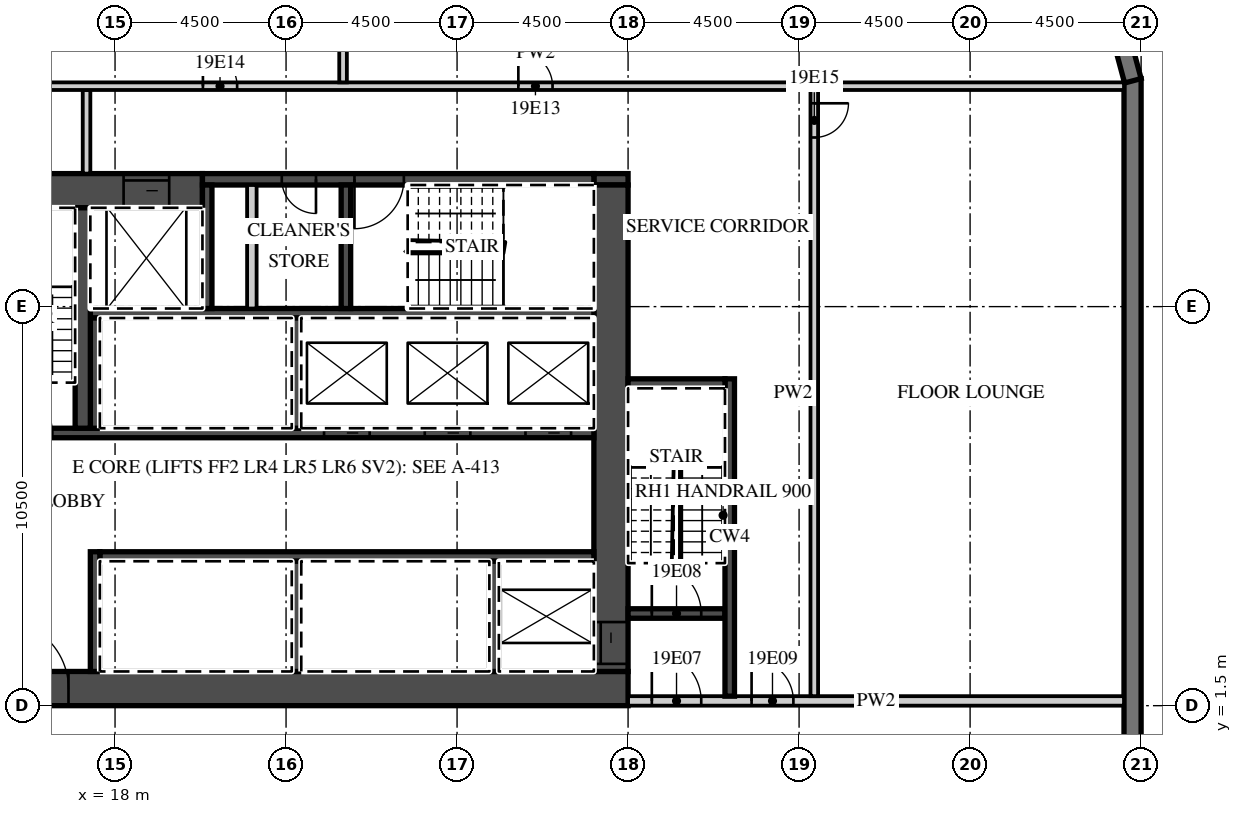
"""IFC4 building model, lengths in metres.
Left out: names, types, materials, properties, quantities, classifications, styles, units other than length and angle.
Written with IfcOpenShell. Run it as: python <this file> out.ifc"""

import sys

from ifc_helpers import new_model, si_unit, direction, frame, frame_2d, origin, place, context, subcontext, project, spatial, polyline, rectangle, outline, extrude, element, fill, save


model = new_model("IFC4")
c1 = context("Model", 3, precision=1e-05, world=origin(), true_north=direction((0.0, 1.0)))
c2 = subcontext(c1, "Body", "Model", "MODEL_VIEW")
j1 = project(units=[si_unit("LENGTHUNIT", "METRE"), si_unit("PLANEANGLEUNIT", "RADIAN")], contexts=[c1])
p1 = place(None, origin())
s1 = spatial("IfcSite", under=j1, at=p1, CompositionType="ELEMENT")
p2 = place(p1, origin())
s2 = spatial("IfcBuilding", under=s1, at=p2, CompositionType="ELEMENT")
p3 = place(p2, frame((0.0, 0.0, 93.0)))
s3 = spatial("IfcBuildingStorey", under=s2, at=p3, CompositionType="ELEMENT", Elevation=93.0)
p4 = place(p3, frame((44.775, -18.0, 0.0), z_axis=(0.0, 0.0, 1.0), x_axis=(0.0, 1.0, 0.0)))
e1 = element("IfcWall", 1, at=p4, inside=s3, PredefinedType="SOLIDWALL", context=c2, shape_type="SweptSolid", body=[
    extrude(rectangle(XDim=36.0, YDim=0.45, at=frame_2d((18.0, 0.0))), origin(), (0.0, 0.0, 1.0), 3.02),
])
p5 = place(p4, frame((3.9, 0.0, 0.45)))
e2 = element("IfcOpeningElement", 2, at=p5, cuts=e1, PredefinedType="OPENING", context=c2, shape_type="SweptSolid", body=[
    extrude(rectangle(XDim=3.3, YDim=2.25, at=frame_2d((1.65, 1.125))), frame((0.0, 0.235, 0.0), z_axis=(0.0, -1.0, 0.0), x_axis=(1.0, 0.0, 0.0)), (0.0, 0.0, 1.0), 0.47),
])
p6 = place(p4, frame((8.4, 0.0, 0.45)))
e3 = element("IfcOpeningElement", 3, at=p6, cuts=e1, PredefinedType="OPENING", context=c2, shape_type="SweptSolid", body=[
    extrude(rectangle(XDim=3.3, YDim=2.25, at=frame_2d((1.65, 1.125))), frame((0.0, 0.235, 0.0), z_axis=(0.0, -1.0, 0.0), x_axis=(1.0, 0.0, 0.0)), (0.0, 0.0, 1.0), 0.47),
])
p7 = place(p4, frame((12.9, 0.0, 0.45)))
e4 = element("IfcOpeningElement", 4, at=p7, cuts=e1, PredefinedType="OPENING", context=c2, shape_type="SweptSolid", body=[
    extrude(rectangle(XDim=3.3, YDim=2.25, at=frame_2d((1.65, 1.125))), frame((0.0, 0.235, 0.0), z_axis=(0.0, -1.0, 0.0), x_axis=(1.0, 0.0, 0.0)), (0.0, 0.0, 1.0), 0.47),
])
p8 = place(p3, frame((44.783, 17.942, 0.0), z_axis=(0.0, 0.0, 1.0), x_axis=(-0.25881466832, 0.965926999034, 0.0)))
e5 = element("IfcWall", 5, at=p8, inside=s3, PredefinedType="SOLIDWALL", context=c2, shape_type="SweptSolid", body=[
    extrude(outline(polyline([(0.0, -0.225), (2.071, -0.225), (1.95, 0.225), (0.121, 0.225), (0.0, -0.225)])), origin(), (0.0, 0.0, 1.0), 3.02),
])
p9 = place(p3, frame((13.5, 1.95, 0.0), z_axis=(0.0, 0.0, 1.0), x_axis=(1.0, 0.0, 0.0)))
e6 = element("IfcWall", 6, at=p9, inside=s3, PredefinedType="SHEAR", context=c2, shape_type="SweptSolid", body=[
    extrude(rectangle(XDim=18.0, YDim=0.9, at=frame_2d((9.0, 0.0))), origin(), (0.0, 0.0, 1.0), 3.02),
])
p10 = place(p9, frame((1.475, 0.0, 0.0)))
e7 = element("IfcOpeningElement", 7, at=p10, cuts=e6, PredefinedType="OPENING", context=c2, shape_type="SweptSolid", body=[
    extrude(rectangle(XDim=1.8, YDim=2.1, at=frame_2d((0.9, 1.05))), frame((0.0, 0.46, 0.0), z_axis=(0.0, -1.0, 0.0), x_axis=(1.0, 0.0, 0.0)), (0.0, 0.0, 1.0), 0.92),
])
p11 = place(p3, frame((13.5, 15.05, 0.0), z_axis=(0.0, 0.0, 1.0), x_axis=(1.0, 0.0, 0.0)))
e8 = element("IfcWall", 8, at=p11, inside=s3, PredefinedType="SHEAR", context=c2, shape_type="SweptSolid", body=[
    extrude(rectangle(XDim=6.8, YDim=0.9, at=frame_2d((3.4, 0.0))), origin(), (0.0, 0.0, 1.0), 3.02),
])
p12 = place(p11, frame((4.725, 0.0, 0.0)))
e9 = element("IfcOpeningElement", 9, at=p12, cuts=e8, PredefinedType="OPENING", context=c2, shape_type="SweptSolid", body=[
    extrude(rectangle(XDim=1.2, YDim=2.1, at=frame_2d((0.6, 1.05))), frame((0.0, 0.46, 0.0), z_axis=(0.0, -1.0, 0.0), x_axis=(1.0, 0.0, 0.0)), (0.0, 0.0, 1.0), 0.92),
])
p13 = place(p3, frame((30.6, 15.35, 0.0), z_axis=(0.0, 0.0, 1.0), x_axis=(1.0, 0.0, 0.0)))
e10 = element("IfcWall", 10, at=p13, inside=s3, PredefinedType="SHEAR", context=c2, shape_type="SweptSolid", body=[
    extrude(rectangle(XDim=0.9, YDim=0.3, at=frame_2d((0.45, 0.0))), origin(), (0.0, 0.0, 1.0), 3.02),
])
p14 = place(p3, frame((20.3, 15.35, 0.0), z_axis=(0.0, 0.0, 1.0), x_axis=(1.0, 0.0, 0.0)))
e11 = element("IfcWall", 11, at=p14, inside=s3, PredefinedType="SHEAR", context=c2, shape_type="SweptSolid", body=[
    extrude(rectangle(XDim=10.3, YDim=0.3, at=frame_2d((5.15, 0.0))), origin(), (0.0, 0.0, 1.0), 3.02),
])
p15 = place(p14, frame((4.0, 0.0, 0.0)))
e12 = element("IfcOpeningElement", 12, at=p15, cuts=e11, PredefinedType="OPENING", context=c2, shape_type="SweptSolid", body=[
    extrude(rectangle(XDim=1.3, YDim=2.1, at=frame_2d((0.65, 1.05))), frame((0.0, 0.16, 0.0), z_axis=(0.0, -1.0, 0.0), x_axis=(1.0, 0.0, 0.0)), (0.0, 0.0, 1.0), 0.32),
])
p16 = place(p14, frame((2.087, 0.0, 0.0)))
e13 = element("IfcOpeningElement", 13, at=p16, cuts=e11, PredefinedType="OPENING", context=c2, shape_type="SweptSolid", body=[
    extrude(rectangle(XDim=0.9, YDim=2.1, at=frame_2d((0.45, 1.05))), frame((0.0, 0.16, 0.0), z_axis=(0.0, -1.0, 0.0), x_axis=(1.0, 0.0, 0.0)), (0.0, 0.0, 1.0), 0.32),
])
p17 = place(p3, frame((31.05, 2.4, 0.0), z_axis=(0.0, 0.0, 1.0), x_axis=(0.0, 1.0, 0.0)))
e14 = element("IfcWall", 14, at=p17, inside=s3, PredefinedType="SHEAR", context=c2, shape_type="SweptSolid", body=[
    extrude(rectangle(XDim=12.8, YDim=0.9, at=frame_2d((6.4, 0.0))), origin(), (0.0, 0.0, 1.0), 3.02),
])
p18 = place(p17, frame((0.2, 0.0, 0.0)))
e15 = element("IfcOpeningElement", 15, at=p18, cuts=e14, PredefinedType="OPENING", context=c2, shape_type="SweptSolid", body=[
    extrude(rectangle(XDim=1.1, YDim=2.1, at=frame_2d((0.55, 1.05))), frame((0.0, 0.46, 0.0), z_axis=(0.0, -1.0, 0.0), x_axis=(1.0, 0.0, 0.0)), (0.0, 0.0, 1.0), 0.92),
])
p19 = place(p3, frame((17.6, 5.425, 0.0), z_axis=(0.0, 0.0, 1.0), x_axis=(1.0, 0.0, 0.0)))
e16 = element("IfcWall", 16, at=p19, inside=s3, PredefinedType="SHEAR", context=c2, shape_type="SweptSolid", body=[
    extrude(rectangle(XDim=13.0, YDim=0.25, at=frame_2d((6.5, 0.0))), origin(), (0.0, 0.0, 1.0), 3.02),
])
p20 = place(p3, frame((17.475, 2.4, 0.0), z_axis=(0.0, 0.0, 1.0), x_axis=(0.0, 1.0, 0.0)))
e17 = element("IfcWall", 17, at=p20, inside=s3, PredefinedType="SHEAR", context=c2, shape_type="SweptSolid", body=[
    extrude(rectangle(XDim=3.15, YDim=0.25, at=frame_2d((1.575, 0.0))), origin(), (0.0, 0.0, 1.0), 3.02),
])
for number, where, z_axis, x_axis in (
    (18, (27.975, 2.4, 0.0), (0.0, 0.0, 1.0), (0.0, 1.0, 0.0)),
    (19, (22.775, 2.4, 0.0), (0.0, 0.0, 1.0), (0.0, 1.0, 0.0)),
):
    element("IfcWall", number, at=place(p3, frame(where, z_axis=z_axis, x_axis=x_axis)), inside=s3, PredefinedType="SHEAR", context=c2, shape_type="SweptSolid", body=[
        extrude(rectangle(XDim=2.9, YDim=0.25, at=frame_2d((1.45, 0.0))), origin(), (0.0, 0.0, 1.0), 3.02),
    ])
p21 = place(p3, frame((14.4, 8.675, 0.0), z_axis=(0.0, 0.0, 1.0), x_axis=(1.0, 0.0, 0.0)))
e20 = element("IfcWall", 20, at=p21, inside=s3, PredefinedType="SHEAR", context=c2, shape_type="SweptSolid", body=[
    extrude(rectangle(XDim=16.2, YDim=0.25, at=frame_2d((8.1, 0.0))), origin(), (0.0, 0.0, 1.0), 3.02),
])
p22 = place(p21, frame((14.4, 0.0, 0.0)))
e21 = element("IfcOpeningElement", 21, at=p22, cuts=e20, PredefinedType="OPENING", context=c2, shape_type="SweptSolid", body=[
    extrude(rectangle(XDim=1.2, YDim=2.1, at=frame_2d((0.6, 1.05))), frame((0.0, 0.135, 0.0), z_axis=(0.0, -1.0, 0.0), x_axis=(1.0, 0.0, 0.0)), (0.0, 0.0, 1.0), 0.27),
])
p23 = place(p21, frame((11.75, 0.0, 0.0)))
e22 = element("IfcOpeningElement", 22, at=p23, cuts=e20, PredefinedType="OPENING", context=c2, shape_type="SweptSolid", body=[
    extrude(rectangle(XDim=1.2, YDim=2.1, at=frame_2d((0.6, 1.05))), frame((0.0, 0.135, 0.0), z_axis=(0.0, -1.0, 0.0), x_axis=(1.0, 0.0, 0.0)), (0.0, 0.0, 1.0), 0.27),
])
p24 = place(p21, frame((9.1, 0.0, 0.0)))
e23 = element("IfcOpeningElement", 23, at=p24, cuts=e20, PredefinedType="OPENING", context=c2, shape_type="SweptSolid", body=[
    extrude(rectangle(XDim=1.2, YDim=2.1, at=frame_2d((0.6, 1.05))), frame((0.0, 0.135, 0.0), z_axis=(0.0, -1.0, 0.0), x_axis=(1.0, 0.0, 0.0)), (0.0, 0.0, 1.0), 0.27),
])
p25 = place(p21, frame((0.65, 0.0, 0.0)))
e24 = element("IfcOpeningElement", 24, at=p25, cuts=e20, PredefinedType="OPENING", context=c2, shape_type="SweptSolid", body=[
    extrude(rectangle(XDim=1.3, YDim=2.1, at=frame_2d((0.65, 1.05))), frame((0.0, 0.135, 0.0), z_axis=(0.0, -1.0, 0.0), x_axis=(1.0, 0.0, 0.0)), (0.0, 0.0, 1.0), 0.27),
])
p26 = place(p3, frame((17.35, 11.825, 0.0), z_axis=(0.0, 0.0, 1.0), x_axis=(1.0, 0.0, 0.0)))
e25 = element("IfcWall", 25, at=p26, inside=s3, PredefinedType="SHEAR", context=c2, shape_type="SweptSolid", body=[
    extrude(rectangle(XDim=13.25, YDim=0.25, at=frame_2d((6.625, 0.0))), origin(), (0.0, 0.0, 1.0), 3.02),
])
for number, where, z_axis, x_axis in (
    (26, (17.475, 8.8, 0.0), (0.0, 0.0, 1.0), (0.0, 1.0, 0.0)),
    (27, (22.775, 8.8, 0.0), (0.0, 0.0, 1.0), (0.0, 1.0, 0.0)),
):
    element("IfcWall", number, at=place(p3, frame(where, z_axis=z_axis, x_axis=x_axis)), inside=s3, PredefinedType="SHEAR", context=c2, shape_type="SweptSolid", body=[
        extrude(rectangle(XDim=2.9, YDim=0.25, at=frame_2d((1.45, 0.0))), origin(), (0.0, 0.0, 1.0), 3.02),
    ])
p27 = place(p3, frame((17.15, 8.8, 0.0), z_axis=(0.0, 0.0, 1.0), x_axis=(0.0, 1.0, 0.0)))
e28 = element("IfcWall", 28, at=p27, inside=s3, PredefinedType="SHEAR", context=c2, shape_type="SweptSolid", body=[
    extrude(rectangle(XDim=5.8, YDim=0.4, at=frame_2d((2.9, 0.0))), origin(), (0.0, 0.0, 1.0), 3.02),
])
for number, where, z_axis, x_axis in (
    (29, (20.425, 11.95, 0.0), (0.0, 0.0, 1.0), (0.0, 1.0, 0.0)),
    (30, (24.075, 11.95, 0.0), (0.0, 0.0, 1.0), (0.0, 1.0, 0.0)),
):
    element("IfcWall", number, at=place(p3, frame(where, z_axis=z_axis, x_axis=x_axis)), inside=s3, PredefinedType="SHEAR", context=c2, shape_type="SweptSolid", body=[
        extrude(rectangle(XDim=3.25, YDim=0.25, at=frame_2d((1.625, 0.0))), origin(), (0.0, 0.0, 1.0), 3.02),
    ])
p28 = place(p3, frame((21.6, 11.95, 0.0), z_axis=(0.0, 0.0, 1.0), x_axis=(0.0, 1.0, 0.0)))
e31 = element("IfcWall", 31, at=p28, inside=s3, PredefinedType="PARTITIONING", context=c2, shape_type="SweptSolid", body=[
    extrude(rectangle(XDim=3.25, YDim=0.25, at=frame_2d((1.625, 0.0))), origin(), (0.0, 0.0, 1.0), 3.02),
])
p29 = place(p3, frame((31.5, 1.625, 0.0), z_axis=(0.0, 0.0, 1.0), x_axis=(1.0, 0.0, 0.0)))
e32 = element("IfcWall", 32, at=p29, inside=s3, PredefinedType="PARTITIONING", context=c2, shape_type="SweptSolid", body=[
    extrude(rectangle(XDim=13.05, YDim=0.25, at=frame_2d((6.525, 0.0))), origin(), (0.0, 0.0, 1.0), 3.02),
])
p30 = place(p29, frame((0.625, 0.0, 0.0)))
e33 = element("IfcOpeningElement", 33, at=p30, cuts=e32, PredefinedType="OPENING", context=c2, shape_type="SweptSolid", body=[
    extrude(rectangle(XDim=1.3, YDim=2.1, at=frame_2d((0.65, 1.05))), frame((0.0, 0.135, 0.0), z_axis=(0.0, -1.0, 0.0), x_axis=(1.0, 0.0, 0.0)), (0.0, 0.0, 1.0), 0.27),
])
p31 = place(p29, frame((3.25, 0.0, 0.0)))
e34 = element("IfcOpeningElement", 34, at=p31, cuts=e32, PredefinedType="OPENING", context=c2, shape_type="SweptSolid", body=[
    extrude(rectangle(XDim=1.1, YDim=2.1, at=frame_2d((0.55, 1.05))), frame((0.0, 0.135, 0.0), z_axis=(0.0, -1.0, 0.0), x_axis=(1.0, 0.0, 0.0)), (0.0, 0.0, 1.0), 0.27),
])
p32 = place(p3, frame((31.5, 3.925, 0.0), z_axis=(0.0, 0.0, 1.0), x_axis=(1.0, 0.0, 0.0)))
e35 = element("IfcWall", 35, at=p32, inside=s3, PredefinedType="SHEAR", context=c2, shape_type="SweptSolid", body=[
    extrude(rectangle(XDim=2.55, YDim=0.25, at=frame_2d((1.275, 0.0))), origin(), (0.0, 0.0, 1.0), 3.02),
])
p33 = place(p32, frame((0.625, 0.0, 0.0)))
e36 = element("IfcOpeningElement", 36, at=p33, cuts=e35, PredefinedType="OPENING", context=c2, shape_type="SweptSolid", body=[
    extrude(rectangle(XDim=1.3, YDim=2.1, at=frame_2d((0.65, 1.05))), frame((0.0, 0.135, 0.0), z_axis=(0.0, -1.0, 0.0), x_axis=(1.0, 0.0, 0.0)), (0.0, 0.0, 1.0), 0.27),
])
p34 = place(p3, frame((34.175, 1.75, 0.0), z_axis=(0.0, 0.0, 1.0), x_axis=(0.0, 1.0, 0.0)))
e37 = element("IfcWall", 37, at=p34, inside=s3, PredefinedType="SHEAR", context=c2, shape_type="SweptSolid", body=[
    extrude(rectangle(XDim=8.35, YDim=0.25, at=frame_2d((4.175, 0.0))), origin(), (0.0, 0.0, 1.0), 3.02),
])
p35 = place(p3, frame((31.5, 9.975, 0.0), z_axis=(0.0, 0.0, 1.0), x_axis=(1.0, 0.0, 0.0)))
e38 = element("IfcWall", 38, at=p35, inside=s3, PredefinedType="SHEAR", context=c2, shape_type="SweptSolid", body=[
    extrude(rectangle(XDim=2.55, YDim=0.25, at=frame_2d((1.275, 0.0))), origin(), (0.0, 0.0, 1.0), 3.02),
])
p36 = place(p3, frame((17.25, 15.5, 0.0), z_axis=(0.0, 0.0, 1.0), x_axis=(0.0, 1.0, 0.0)))
e39 = element("IfcWall", 39, at=p36, inside=s3, PredefinedType="PARTITIONING", context=c2, shape_type="SweptSolid", body=[
    extrude(rectangle(XDim=2.2, YDim=0.2, at=frame_2d((1.1, 0.0))), origin(), (0.0, 0.0, 1.0), 3.02),
])
p37 = place(p3, frame((36.4, 1.75, 0.0), z_axis=(0.0, 0.0, 1.0), x_axis=(0.0, 1.0, 0.0)))
e40 = element("IfcWall", 40, at=p37, inside=s3, PredefinedType="PARTITIONING", context=c2, shape_type="SweptSolid", body=[
    extrude(rectangle(XDim=15.95, YDim=0.2, at=frame_2d((7.975, 0.0))), origin(), (0.0, 0.0, 1.0), 3.02),
])
p38 = place(p37, frame((14.7, 0.0, 0.0)))
e41 = element("IfcOpeningElement", 41, at=p38, cuts=e40, PredefinedType="OPENING", context=c2, shape_type="SweptSolid", body=[
    extrude(rectangle(XDim=0.9, YDim=2.1, at=frame_2d((0.45, 1.05))), frame((0.0, 0.11, 0.0), z_axis=(0.0, -1.0, 0.0), x_axis=(1.0, 0.0, 0.0)), (0.0, 0.0, 1.0), 0.22),
])
p39 = place(p3, frame((13.6, 17.8, 0.0), z_axis=(0.0, 0.0, 1.0), x_axis=(1.0, 0.0, 0.0)))
e42 = element("IfcWall", 42, at=p39, inside=s3, PredefinedType="PARTITIONING", context=c2, shape_type="SweptSolid", body=[
    extrude(rectangle(XDim=30.95, YDim=0.2, at=frame_2d((15.475, 0.0))), origin(), (0.0, 0.0, 1.0), 3.02),
])
p40 = place(p39, frame((15.012, 0.0, 0.0)))
e43 = element("IfcOpeningElement", 43, at=p40, cuts=e42, PredefinedType="OPENING", context=c2, shape_type="SweptSolid", body=[
    extrude(rectangle(XDim=0.9, YDim=2.1, at=frame_2d((0.45, 1.05))), frame((0.0, 0.11, 0.0), z_axis=(0.0, -1.0, 0.0), x_axis=(1.0, 0.0, 0.0)), (0.0, 0.0, 1.0), 0.22),
])
p41 = place(p39, frame((6.712, 0.0, 0.0)))
e44 = element("IfcOpeningElement", 44, at=p41, cuts=e42, PredefinedType="OPENING", context=c2, shape_type="SweptSolid", body=[
    extrude(rectangle(XDim=0.9, YDim=2.1, at=frame_2d((0.45, 1.05))), frame((0.0, 0.11, 0.0), z_axis=(0.0, -1.0, 0.0), x_axis=(1.0, 0.0, 0.0)), (0.0, 0.0, 1.0), 0.22),
])
p42 = place(p3, frame((24.0, 17.9, 0.0), z_axis=(0.0, 0.0, 1.0), x_axis=(0.0, 1.0, 0.0)))
e45 = element("IfcWall", 45, at=p42, inside=s3, PredefinedType="PARTITIONING", context=c2, shape_type="SweptSolid", body=[
    extrude(rectangle(XDim=3.65, YDim=0.2, at=frame_2d((1.825, 0.0))), origin(), (0.0, 0.0, 1.0), 3.02),
])
p43 = place(p22, origin())
e46 = element("IfcDoor", 46, at=p43, inside=s3, OperationType="SLIDING_TO_LEFT", PredefinedType="DOOR", context=c2, shape_type="SweptSolid", body=[
    extrude(rectangle(XDim=1.2, YDim=2.1, at=frame_2d((0.6, 1.05))), frame((0.0, 0.025, 0.0), z_axis=(0.0, -1.0, 0.0), x_axis=(1.0, 0.0, 0.0)), (0.0, 0.0, 1.0), 0.05),
])
fill(e21, e46)
p44 = place(p23, origin())
e47 = element("IfcDoor", 47, at=p44, inside=s3, OperationType="SLIDING_TO_RIGHT", PredefinedType="DOOR", context=c2, shape_type="SweptSolid", body=[
    extrude(rectangle(XDim=1.2, YDim=2.1, at=frame_2d((0.6, 1.05))), frame((0.0, 0.025, 0.0), z_axis=(0.0, -1.0, 0.0), x_axis=(1.0, 0.0, 0.0)), (0.0, 0.0, 1.0), 0.05),
])
fill(e22, e47)
p45 = place(p24, origin())
e48 = element("IfcDoor", 48, at=p45, inside=s3, OperationType="SLIDING_TO_RIGHT", PredefinedType="DOOR", context=c2, shape_type="SweptSolid", body=[
    extrude(rectangle(XDim=1.2, YDim=2.1, at=frame_2d((0.6, 1.05))), frame((0.0, 0.025, 0.0), z_axis=(0.0, -1.0, 0.0), x_axis=(1.0, 0.0, 0.0)), (0.0, 0.0, 1.0), 0.05),
])
fill(e23, e48)
p46 = place(p12, origin())
e49 = element("IfcDoor", 49, at=p46, inside=s3, OperationType="SLIDING_TO_LEFT", PredefinedType="DOOR", context=c2, shape_type="SweptSolid", body=[
    extrude(rectangle(XDim=1.2, YDim=2.1, at=frame_2d((0.6, 1.05))), frame((0.0, 0.025, 0.0), z_axis=(0.0, -1.0, 0.0), x_axis=(1.0, 0.0, 0.0)), (0.0, 0.0, 1.0), 0.05),
])
fill(e9, e49)
p47 = place(p18, origin())
e50 = element("IfcDoor", 50, at=p47, inside=s3, OperationType="SLIDING_TO_LEFT", PredefinedType="DOOR", context=c2, shape_type="SweptSolid", body=[
    extrude(rectangle(XDim=1.1, YDim=2.1, at=frame_2d((0.55, 1.05))), frame((0.0, 0.025, 0.0), z_axis=(0.0, -1.0, 0.0), x_axis=(1.0, 0.0, 0.0)), (0.0, 0.0, 1.0), 0.05),
])
fill(e15, e50)
p48 = place(p10, origin())
e51 = element("IfcDoor", 51, at=p48, inside=s3, OperationType="DOUBLE_DOOR_DOUBLE_SWING", PredefinedType="DOOR", context=c2, shape_type="SweptSolid", body=[
    extrude(rectangle(XDim=1.8, YDim=2.1, at=frame_2d((0.9, 1.05))), frame((0.0, 0.025, 0.0), z_axis=(0.0, -1.0, 0.0), x_axis=(1.0, 0.0, 0.0)), (0.0, 0.0, 1.0), 0.05),
])
fill(e7, e51)
p49 = place(p30, origin())
e52 = element("IfcDoor", 52, at=p49, inside=s3, OperationType="SINGLE_SWING_LEFT", PredefinedType="DOOR", context=c2, shape_type="SweptSolid", body=[
    extrude(rectangle(XDim=1.3, YDim=2.1, at=frame_2d((0.65, 1.05))), frame((0.0, 0.025, 0.0), z_axis=(0.0, -1.0, 0.0), x_axis=(1.0, 0.0, 0.0)), (0.0, 0.0, 1.0), 0.05),
])
fill(e33, e52)
p50 = place(p33, origin())
e53 = element("IfcDoor", 53, at=p50, inside=s3, OperationType="SINGLE_SWING_LEFT", PredefinedType="DOOR", context=c2, shape_type="SweptSolid", body=[
    extrude(rectangle(XDim=1.3, YDim=2.1, at=frame_2d((0.65, 1.05))), frame((0.0, 0.025, 0.0), z_axis=(0.0, -1.0, 0.0), x_axis=(1.0, 0.0, 0.0)), (0.0, 0.0, 1.0), 0.05),
])
fill(e36, e53)
p51 = place(p31, origin())
e54 = element("IfcDoor", 54, at=p51, inside=s3, OperationType="SINGLE_SWING_LEFT", PredefinedType="DOOR", context=c2, shape_type="SweptSolid", body=[
    extrude(rectangle(XDim=1.1, YDim=2.1, at=frame_2d((0.55, 1.05))), frame((0.0, 0.025, 0.0), z_axis=(0.0, -1.0, 0.0), x_axis=(1.0, 0.0, 0.0)), (0.0, 0.0, 1.0), 0.05),
])
fill(e34, e54)
p52 = place(p15, origin())
e55 = element("IfcDoor", 55, at=p52, inside=s3, OperationType="SINGLE_SWING_LEFT", PredefinedType="DOOR", context=c2, shape_type="SweptSolid", body=[
    extrude(rectangle(XDim=1.3, YDim=2.1, at=frame_2d((0.65, 1.05))), frame((0.0, 0.025, 0.0), z_axis=(0.0, -1.0, 0.0), x_axis=(1.0, 0.0, 0.0)), (0.0, 0.0, 1.0), 0.05),
])
fill(e12, e55)
p53 = place(p16, origin())
e56 = element("IfcDoor", 56, at=p53, inside=s3, OperationType="SINGLE_SWING_RIGHT", PredefinedType="DOOR", context=c2, shape_type="SweptSolid", body=[
    extrude(rectangle(XDim=0.9, YDim=2.1, at=frame_2d((0.45, 1.05))), frame((0.0, 0.025, 0.0), z_axis=(0.0, -1.0, 0.0), x_axis=(1.0, 0.0, 0.0)), (0.0, 0.0, 1.0), 0.05),
])
fill(e13, e56)
p54 = place(p40, origin())
e57 = element("IfcDoor", 57, at=p54, inside=s3, OperationType="SINGLE_SWING_LEFT", PredefinedType="DOOR", context=c2, shape_type="SweptSolid", body=[
    extrude(rectangle(XDim=0.9, YDim=2.1, at=frame_2d((0.45, 1.05))), frame((0.0, 0.025, 0.0), z_axis=(0.0, -1.0, 0.0), x_axis=(1.0, 0.0, 0.0)), (0.0, 0.0, 1.0), 0.05),
])
fill(e43, e57)
p55 = place(p41, origin())
e58 = element("IfcDoor", 58, at=p55, inside=s3, OperationType="SINGLE_SWING_LEFT", PredefinedType="DOOR", context=c2, shape_type="SweptSolid", body=[
    extrude(rectangle(XDim=0.9, YDim=2.1, at=frame_2d((0.45, 1.05))), frame((0.0, 0.025, 0.0), z_axis=(0.0, -1.0, 0.0), x_axis=(1.0, 0.0, 0.0)), (0.0, 0.0, 1.0), 0.05),
])
fill(e44, e58)
p56 = place(p38, origin())
e59 = element("IfcDoor", 59, at=p56, inside=s3, OperationType="SINGLE_SWING_RIGHT", PredefinedType="DOOR", context=c2, shape_type="SweptSolid", body=[
    extrude(rectangle(XDim=0.9, YDim=2.1, at=frame_2d((0.45, 1.05))), frame((0.0, 0.025, 0.0), z_axis=(0.0, -1.0, 0.0), x_axis=(1.0, 0.0, 0.0)), (0.0, 0.0, 1.0), 0.05),
])
fill(e41, e59)
save(model, sys.argv[1])
